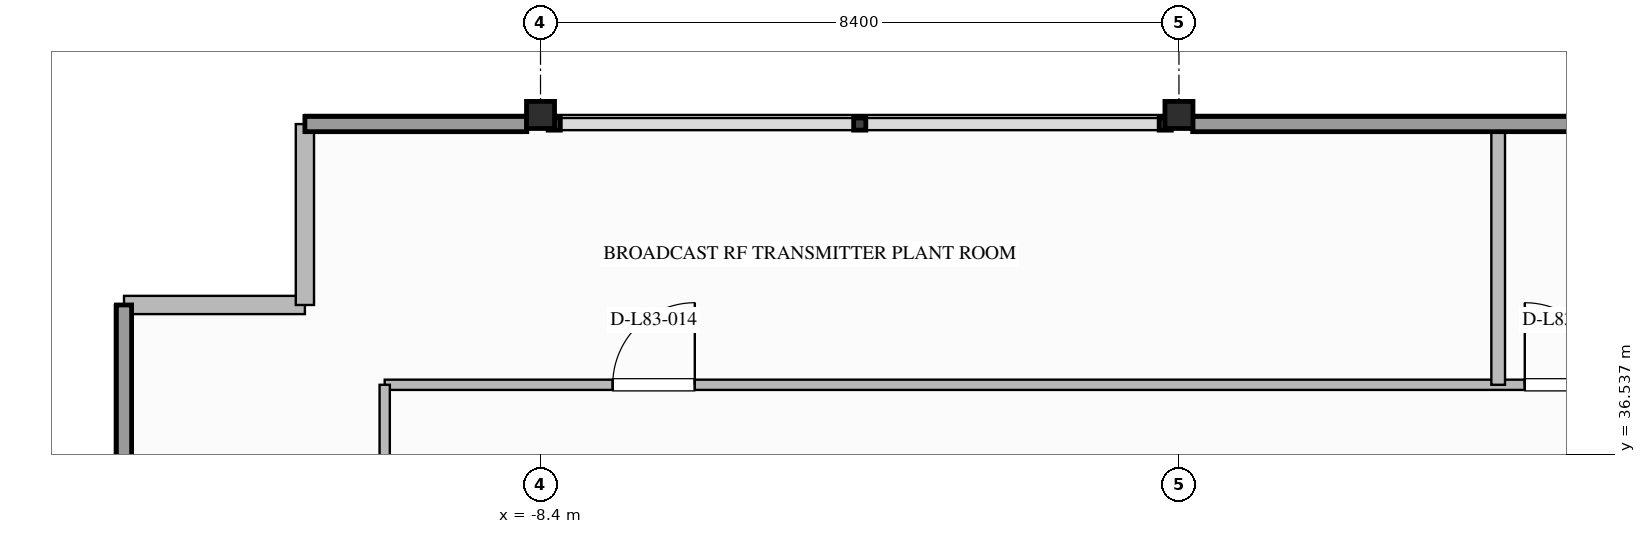
"""IFC4 building model, lengths in metres.
Left out: names, types, materials, properties, quantities, classifications, styles, units other than length and angle.
Written with IfcOpenShell. Run it as: python <this file> out.ifc"""

import sys

from ifc_helpers import new_model, si_unit, direction, frame, frame_2d, origin, origin_2d, place, context, subcontext, project, spatial, rectangle, i_section, extrude, element, fill, save


model = new_model("IFC4")
c1 = context("Model", 3, precision=1e-05, world=origin(), true_north=direction((0.0, 1.0)))
c2 = subcontext(c1, "Body", "Model", "MODEL_VIEW")
j1 = project(units=[si_unit("LENGTHUNIT", "METRE"), si_unit("PLANEANGLEUNIT", "RADIAN")], contexts=[c1])
p1 = place(None, origin())
s1 = spatial("IfcSite", under=j1, at=p1, CompositionType="ELEMENT")
p2 = place(p1, origin())
s2 = spatial("IfcBuilding", under=s1, at=p2, CompositionType="ELEMENT")
p3 = place(p2, frame((0.0, 0.0, 319.4)))
s3 = spatial("IfcBuildingStorey", under=s2, at=p3, CompositionType="ELEMENT", Elevation=319.4)
for number, where, z_axis, x_axis in (
    (1, (-8.4, 41.0, 0.0), (0.0, 0.0, 1.0), (1.0, 0.0, 0.0)),
    (2, (0.0, 41.0, 0.0), (0.0, 0.0, 1.0), (1.0, 0.0, 0.0)),
):
    element("IfcColumn", number, at=place(p3, frame(where, z_axis=z_axis, x_axis=x_axis)), inside=s3, PredefinedType="COLUMN", context=c2, shape_type="SweptSolid", body=[
        extrude(i_section(OverallWidth=0.369, OverallDepth=0.356, WebThickness=0.011, FlangeThickness=0.018, FilletRadius=0.025, at=origin_2d()), origin(), (0.0, 0.0, 1.0), 3.797),
    ])
for number, where, z_axis, x_axis in (
    (3, (-13.88, 38.5, 0.0), (0.0, 0.0, 1.0), (1.0, 0.0, 0.0)),
    (4, (-11.5, 38.5, 0.0), (0.0, 0.0, 1.0), (0.0, 1.0, 0.0)),
):
    element("IfcWall", number, at=place(p3, frame(where, z_axis=z_axis, x_axis=x_axis)), inside=s3, PredefinedType="STANDARD", context=c2, shape_type="SweptSolid", body=[
        extrude(rectangle(XDim=2.38, YDim=0.24, at=frame_2d((1.19, 0.0))), origin(), (0.0, 0.0, 1.0), 3.48),
    ])
p4 = place(p3, frame((-10.45, 37.45, 0.0), z_axis=(0.0, 0.0, 1.0), x_axis=(1.0, 0.0, 0.0)))
e5 = element("IfcWall", 5, at=p4, inside=s3, PredefinedType="PARTITIONING", context=c2, shape_type="SweptSolid", body=[
    extrude(rectangle(XDim=20.9, YDim=0.135, at=frame_2d((10.45, 0.0))), origin(), (0.0, 0.0, 1.0), 3.48),
])
p5 = place(p4, frame((3.0, 0.0, 0.0)))
e6 = element("IfcOpeningElement", 6, at=p5, cuts=e5, PredefinedType="OPENING", context=c2, shape_type="SweptSolid", body=[
    extrude(rectangle(XDim=1.08, YDim=2.04, at=frame_2d((0.54, 1.02))), frame((0.0, 0.077, 0.0), z_axis=(0.0, -1.0, 0.0), x_axis=(1.0, 0.0, 0.0)), (0.0, 0.0, 1.0), 0.155),
])
p6 = place(p4, frame((15.0, 0.0, 0.0)))
e7 = element("IfcOpeningElement", 7, at=p6, cuts=e5, PredefinedType="OPENING", context=c2, shape_type="SweptSolid", body=[
    extrude(rectangle(XDim=1.08, YDim=2.04, at=frame_2d((0.54, 1.02))), frame((0.0, 0.077, 0.0), z_axis=(0.0, -1.0, 0.0), x_axis=(1.0, 0.0, 0.0)), (0.0, 0.0, 1.0), 0.155),
])
p7 = place(p3, frame((-10.45, 16.55, 0.0), z_axis=(0.0, 0.0, 1.0), x_axis=(0.0, 1.0, 0.0)))
e8 = element("IfcWall", 8, at=p7, inside=s3, PredefinedType="PARTITIONING", context=c2, shape_type="SweptSolid", body=[
    extrude(rectangle(XDim=20.9, YDim=0.135, at=frame_2d((10.45, 0.0))), origin(), (0.0, 0.0, 1.0), 3.48),
])
p8 = place(p7, frame((8.0, 0.0, 0.0)))
e9 = element("IfcOpeningElement", 9, at=p8, cuts=e8, PredefinedType="OPENING", context=c2, shape_type="SweptSolid", body=[
    extrude(rectangle(XDim=1.08, YDim=2.04, at=frame_2d((0.54, 1.02))), frame((0.0, 0.077, 0.0), z_axis=(0.0, -1.0, 0.0), x_axis=(1.0, 0.0, 0.0)), (0.0, 0.0, 1.0), 0.155),
])
p9 = place(p3, frame((4.2, 37.45, 0.0), z_axis=(0.0, 0.0, 1.0), x_axis=(0.0, 1.0, 0.0)))
e10 = element("IfcWall", 10, at=p9, inside=s3, PredefinedType="SOLIDWALL", context=c2, shape_type="SweptSolid", body=[
    extrude(rectangle(XDim=3.43, YDim=0.18, at=frame_2d((1.715, 0.0))), origin(), (0.0, 0.0, 1.0), 3.48),
])
p10 = place(p5, origin())
e11 = element("IfcDoor", 11, at=p10, inside=s3, OperationType="SINGLE_SWING_RIGHT", PredefinedType="DOOR", context=c2, shape_type="SweptSolid", body=[
    extrude(rectangle(XDim=1.08, YDim=2.04, at=frame_2d((0.54, 1.02))), frame((0.0, 0.025, 0.0), z_axis=(0.0, -1.0, 0.0), x_axis=(1.0, 0.0, 0.0)), (0.0, 0.0, 1.0), 0.05),
])
fill(e6, e11)
p11 = place(p6, origin())
e12 = element("IfcDoor", 12, at=p11, inside=s3, OperationType="SINGLE_SWING_LEFT", PredefinedType="DOOR", context=c2, shape_type="SweptSolid", body=[
    extrude(rectangle(XDim=1.08, YDim=2.04, at=frame_2d((0.54, 1.02))), frame((0.0, 0.025, 0.0), z_axis=(0.0, -1.0, 0.0), x_axis=(1.0, 0.0, 0.0)), (0.0, 0.0, 1.0), 0.05),
])
fill(e7, e12)
save(model, sys.argv[1])
